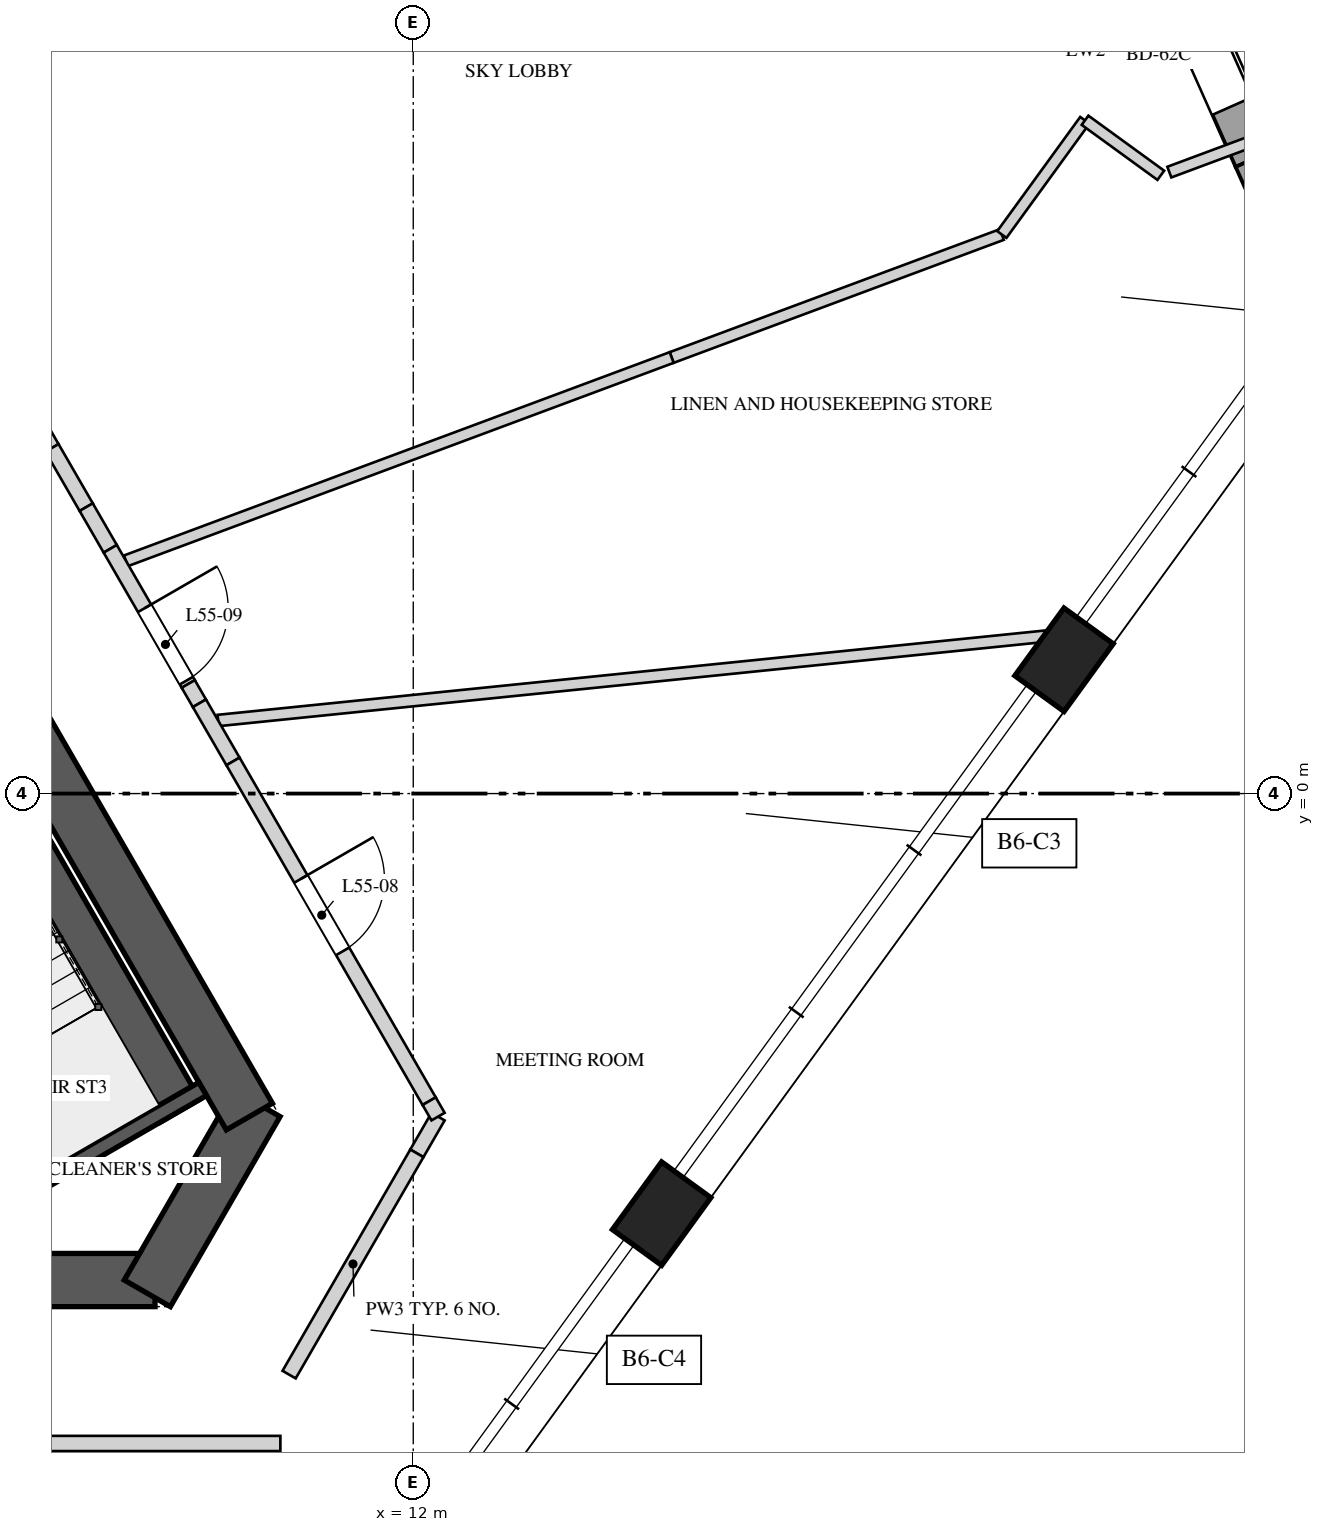
"""IFC4 building model, lengths in metres.
Left out: names, types, materials, properties, quantities, classifications, styles, units other than length and angle.
Written with IfcOpenShell. Run it as: python <this file> out.ifc"""

import sys

from ifc_helpers import new_model, si_unit, direction, frame, frame_2d, origin, origin_2d, place, context, subcontext, project, spatial, polyline, rectangle, outline, extrude, element, fill, save


model = new_model("IFC4")
c1 = context("Model", 3, precision=1e-05, world=origin(), true_north=direction((0.0, 1.0)))
c2 = subcontext(c1, "Body", "Model", "MODEL_VIEW")
j1 = project(units=[si_unit("LENGTHUNIT", "METRE"), si_unit("PLANEANGLEUNIT", "RADIAN")], contexts=[c1])
p1 = place(None, origin())
s1 = spatial("IfcSite", under=j1, at=p1, CompositionType="ELEMENT")
p2 = place(p1, origin())
s2 = spatial("IfcBuilding", under=s1, at=p2, CompositionType="ELEMENT")
p3 = place(p2, frame((0.0, 0.0, 237.2)))
s3 = spatial("IfcBuildingStorey", under=s2, at=p3, CompositionType="ELEMENT", Elevation=237.2)
p4 = place(p3, frame((-8.603, -6.4, 0.0), z_axis=(0.0, 0.0, 1.0), x_axis=(1.0, 0.0, 0.0)))
e1 = element("IfcWall", 1, at=p4, inside=s3, PredefinedType="SHEAR", context=c2, shape_type="SweptSolid", body=[
    extrude(rectangle(XDim=17.205, YDim=0.7, at=frame_2d((8.603, 0.0))), origin(), (0.0, 0.0, 1.0), 4.0),
])
p5 = place(p4, frame((6.808, 0.0, 0.0)))
e2 = element("IfcOpeningElement", 2, at=p5, cuts=e1, PredefinedType="OPENING", context=c2, shape_type="SweptSolid", body=[
    extrude(rectangle(XDim=1.0, YDim=2.4, at=frame_2d((0.5, 1.2))), frame((0.0, 0.36, 0.0), z_axis=(0.0, -1.0, 0.0), x_axis=(1.0, 0.0, 0.0)), (0.0, 0.0, 1.0), 0.72),
])
p6 = place(p4, frame((14.922, 0.0, 0.0)))
e3 = element("IfcOpeningElement", 3, at=p6, cuts=e1, PredefinedType="OPENING", context=c2, shape_type="SweptSolid", body=[
    extrude(rectangle(XDim=0.8, YDim=2.1, at=frame_2d((0.4, 1.05))), frame((0.0, 0.36, 0.0), z_axis=(0.0, -1.0, 0.0), x_axis=(1.0, 0.0, 0.0)), (0.0, 0.0, 1.0), 0.72),
])
p7 = place(p3, frame((8.501, -6.575, 0.0), z_axis=(0.0, 0.0, 1.0), x_axis=(0.499995765644, 0.866027848477, 0.0)))
e4 = element("IfcWall", 4, at=p7, inside=s3, PredefinedType="SHEAR", context=c2, shape_type="SweptSolid", body=[
    extrude(rectangle(XDim=2.887, YDim=0.7, at=frame_2d((1.443, 0.0))), origin(), (0.0, 0.0, 1.0), 4.0),
])
p8 = place(p3, frame((9.844, -4.25, 0.0), z_axis=(0.0, 0.0, 1.0), x_axis=(-0.500003331888, 0.866023480109, 0.0)))
e5 = element("IfcWall", 5, at=p8, inside=s3, PredefinedType="SHEAR", context=c2, shape_type="SweptSolid", body=[
    extrude(rectangle(XDim=17.205, YDim=0.7, at=frame_2d((8.603, 0.0))), origin(), (0.0, 0.0, 1.0), 4.0),
])
p9 = place(p8, frame((6.877, 0.0, 0.0)))
e6 = element("IfcOpeningElement", 6, at=p9, cuts=e5, PredefinedType="OPENING", context=c2, shape_type="SweptSolid", body=[
    extrude(rectangle(XDim=1.0, YDim=2.4, at=frame_2d((0.5, 1.2))), frame((0.0, 0.36, 0.0), z_axis=(0.0, -1.0, 0.0), x_axis=(1.0, 0.0, 0.0)), (0.0, 0.0, 1.0), 0.72),
])
for number, where, z_axis, x_axis in (
    (7, (15.268, -5.526, -0.35), (0.0, 0.0, 1.0), (0.588, 0.809, 0.0)),
    (8, (20.562, 1.76, -0.35), (0.0, 0.0, 1.0), (0.588, 0.809, 0.0)),
):
    element("IfcColumn", number, at=place(p3, frame(where, z_axis=z_axis, x_axis=x_axis)), inside=s3, PredefinedType="COLUMN", context=c2, shape_type="SweptSolid", body=[
        extrude(rectangle(XDim=1.1, YDim=0.8, at=origin_2d()), origin(), (0.0, 0.0, 1.0), 4.35),
    ])
p10 = place(p3, frame((21.807, 11.625, 0.0), z_axis=(0.0, 0.0, 1.0), x_axis=(0.406727323635, -0.913549606868, 0.0)))
e9 = element("IfcWall", 9, at=p10, inside=s3, PredefinedType="SOLIDWALL", context=c2, shape_type="SweptSolid", body=[
    extrude(rectangle(XDim=3.5, YDim=0.9, at=frame_2d((1.75, 0.0))), origin(), (0.0, 0.0, 1.0), 3.3),
])
p11 = place(p10, frame((0.75, 0.0, 0.0)))
e10 = element("IfcOpeningElement", 10, at=p11, cuts=e9, PredefinedType="OPENING", context=c2, shape_type="SweptSolid", body=[
    extrude(rectangle(XDim=2.0, YDim=2.4, at=frame_2d((1.0, 1.2))), frame((0.0, 0.46, 0.0), z_axis=(0.0, -1.0, 0.0), x_axis=(1.0, 0.0, 0.0)), (0.0, 0.0, 1.0), 0.92),
])
p12 = place(p3, frame((24.719, 8.844, 0.0), z_axis=(0.0, 0.0, 1.0), x_axis=(-0.913562124494, -0.406699206651, 0.0)))
e11 = element("IfcWall", 11, at=p12, inside=s3, PredefinedType="SOLIDWALL", context=c2, shape_type="SweptSolid", body=[
    extrude(rectangle(XDim=1.979, YDim=0.45, at=frame_2d((0.99, 0.0))), origin(), (0.0, 0.0, 1.0), 2.55),
])
p13 = place(p3, frame((8.933, -4.172, 0.0), z_axis=(0.0, 0.0, 1.0), x_axis=(-0.500026960575, 0.86600983753, 0.0)))
e12 = element("IfcWall", 12, at=p13, inside=s3, PredefinedType="SOLIDWALL", context=c2, shape_type="SweptSolid", body=[
    extrude(rectangle(XDim=6.2, YDim=0.6, at=frame_2d((3.1, 0.0))), origin(), (0.0, 0.0, 1.0), 3.65),
])
p14 = place(p3, frame((6.501, -5.461, 0.0), z_axis=(0.0, 0.0, 1.0), x_axis=(0.866035871367, 0.499981869177, 0.0)))
e13 = element("IfcWall", 13, at=p14, inside=s3, PredefinedType="SOLIDWALL", context=c2, shape_type="SweptSolid", body=[
    extrude(rectangle(XDim=3.15, YDim=0.2, at=frame_2d((1.575, 0.0))), origin(), (0.0, 0.0, 1.0), 3.65),
])
p15 = place(p3, frame((9.433, 0.961, 0.0), z_axis=(0.0, 0.0, 1.0), x_axis=(0.994848032618, 0.101377472819, 0.0)))
e14 = element("IfcWall", 14, at=p15, inside=s3, PredefinedType="PARTITIONING", context=c2, shape_type="SweptSolid", body=[
    extrude(rectangle(XDim=11.222, YDim=0.15, at=frame_2d((5.611, 0.0))), origin(), (0.0, 0.0, 1.0), 2.75),
])
p16 = place(p3, frame((19.743, 7.355, 0.0), z_axis=(0.0, 0.0, 1.0), x_axis=(-0.937095289684, -0.349073657058, 0.0)))
e15 = element("IfcWall", 15, at=p16, inside=s3, PredefinedType="PARTITIONING", context=c2, shape_type="SweptSolid", body=[
    extrude(rectangle(XDim=4.635, YDim=0.15, at=frame_2d((2.318, 0.0))), origin(), (0.0, 0.0, 1.0), 3.65),
])
p17 = place(p3, frame((15.399, 5.737, 0.0), z_axis=(0.0, 0.0, 1.0), x_axis=(-0.937094379244, -0.349076101144, 0.0)))
e16 = element("IfcWall", 16, at=p17, inside=s3, PredefinedType="PARTITIONING", context=c2, shape_type="SweptSolid", body=[
    extrude(rectangle(XDim=7.661, YDim=0.15, at=frame_2d((3.831, 0.0))), origin(), (0.0, 0.0, 1.0), 2.55),
])
p18 = place(p3, frame((20.835, 8.858, 0.0), z_axis=(0.0, 0.0, 1.0), x_axis=(-0.587796499564, -0.809008822634, 0.0)))
e17 = element("IfcWall", 17, at=p18, inside=s3, PredefinedType="PARTITIONING", context=c2, shape_type="SweptSolid", body=[
    extrude(rectangle(XDim=1.857, YDim=0.15, at=frame_2d((0.929, 0.0))), origin(), (0.0, 0.0, 1.0), 3.65),
])
p19 = place(p3, frame((21.835, 8.134, 0.0), z_axis=(0.0, 0.0, 1.0), x_axis=(-0.808993112519, 0.587818121443, 0.0)))
e18 = element("IfcWall", 18, at=p19, inside=s3, PredefinedType="PARTITIONING", context=c2, shape_type="SweptSolid", body=[
    extrude(rectangle(XDim=1.232, YDim=0.15, at=frame_2d((0.616, 0.0))), origin(), (0.0, 0.0, 1.0), 3.65),
])
p20 = place(p3, frame((23.031, 8.58, 0.0), z_axis=(0.0, 0.0, 1.0), x_axis=(-0.937141646559, -0.348949185819, 0.0)))
e19 = element("IfcWall", 19, at=p20, inside=s3, PredefinedType="PARTITIONING", context=c2, shape_type="SweptSolid", body=[
    extrude(rectangle(XDim=1.157, YDim=0.15, at=frame_2d((0.579, 0.0))), origin(), (0.0, 0.0, 1.0), 3.65),
])
p21 = place(p3, frame((12.326, -4.25, 0.0), z_axis=(0.0, 0.0, 1.0), x_axis=(-0.500000383388, -0.866025182435, 0.0)))
e20 = element("IfcWall", 20, at=p21, inside=s3, PredefinedType="SOLIDWALL", context=c2, shape_type="SweptSolid", body=[
    extrude(rectangle(XDim=0.558, YDim=0.2, at=frame_2d((0.279, 0.0))), origin(), (0.0, 0.0, 1.0), 2.95),
])
p22 = place(p3, frame((12.048, -4.733, 0.0), z_axis=(0.0, 0.0, 1.0), x_axis=(-0.500005339912, -0.866022320763, 0.0)))
e21 = element("IfcWall", 21, at=p22, inside=s3, PredefinedType="SOLIDWALL", context=c2, shape_type="SweptSolid", body=[
    extrude(rectangle(XDim=3.362, YDim=0.2, at=frame_2d((1.681, 0.0))), origin(), (0.0, 0.0, 1.0), 3.65),
])
p23 = place(p3, frame((10.252, -8.55, 0.0), z_axis=(0.0, 0.0, 1.0), x_axis=(-1.0, 0.0, 0.0)))
e22 = element("IfcWall", 22, at=p23, inside=s3, PredefinedType="SOLIDWALL", context=c2, shape_type="SweptSolid", body=[
    extrude(rectangle(XDim=3.153, YDim=0.2, at=frame_2d((1.576, 0.0))), origin(), (0.0, 0.0, 1.0), 3.65),
])
p24 = place(p3, frame((6.615, 5.643, 0.0), z_axis=(0.0, 0.0, 1.0), x_axis=(0.499978579288, -0.866037770685, 0.0)))
e23 = element("IfcWall", 23, at=p24, inside=s3, PredefinedType="SOLIDWALL", context=c2, shape_type="SweptSolid", body=[
    extrude(rectangle(XDim=1.265, YDim=0.2, at=frame_2d((0.633, 0.0))), origin(), (0.0, 0.0, 1.0), 3.65),
])
p25 = place(p3, frame((7.247, 4.548, 0.0), z_axis=(0.0, 0.0, 1.0), x_axis=(0.499902469156, -0.866081705922, 0.0)))
e24 = element("IfcWall", 24, at=p25, inside=s3, PredefinedType="SOLIDWALL", context=c2, shape_type="SweptSolid", body=[
    extrude(rectangle(XDim=0.9, YDim=0.2, at=frame_2d((0.45, 0.0))), origin(), (0.0, 0.0, 1.0), 2.55),
])
p26 = place(p3, frame((7.697, 3.768, 0.0), z_axis=(0.0, 0.0, 1.0), x_axis=(0.50012328804, -0.865954211699, 0.0)))
e25 = element("IfcWall", 25, at=p26, inside=s3, PredefinedType="SOLIDWALL", context=c2, shape_type="SweptSolid", body=[
    extrude(rectangle(XDim=0.633, YDim=0.2, at=frame_2d((0.316, 0.0))), origin(), (0.0, 0.0, 1.0), 3.65),
])
p27 = place(p3, frame((8.013, 3.22, 0.0), z_axis=(0.0, 0.0, 1.0), x_axis=(0.500014089762, -0.866017268904, 0.0)))
e26 = element("IfcWall", 26, at=p27, inside=s3, PredefinedType="SOLIDWALL", context=c2, shape_type="SweptSolid", body=[
    extrude(outline(polyline([(0.0, 0.0), (2.053, 0.0), (2.053, 3.65), (0.917, 3.65), (0.917, 2.55), (0.0, 2.55), (0.0, 0.0)])), frame((0.0, 0.1, 0.0), z_axis=(0.0, -1.0, 0.0), x_axis=(1.0, 0.0, 0.0)), (0.0, 0.0, 1.0), 0.2),
])
p28 = place(p27, frame((0.903, 0.0, 0.0)))
e27 = element("IfcOpeningElement", 27, at=p28, cuts=e26, PredefinedType="OPENING", context=c2, shape_type="SweptSolid", body=[
    extrude(rectangle(XDim=1.1, YDim=2.4, at=frame_2d((0.55, 1.2))), frame((0.0, 0.11, 0.0), z_axis=(0.0, -1.0, 0.0), x_axis=(1.0, 0.0, 0.0)), (0.0, 0.0, 1.0), 0.22),
])
p29 = place(p3, frame((9.04, 1.442, 0.0), z_axis=(0.0, 0.0, 1.0), x_axis=(0.499986503906, -0.866033195618, 0.0)))
e28 = element("IfcWall", 28, at=p29, inside=s3, PredefinedType="SOLIDWALL", context=c2, shape_type="SweptSolid", body=[
    extrude(rectangle(XDim=0.293, YDim=0.2, at=frame_2d((0.147, 0.0))), origin(), (0.0, 0.0, 1.0), 3.65),
])
p30 = place(p3, frame((9.187, 1.188, 0.0), z_axis=(0.0, 0.0, 1.0), x_axis=(0.500121072013, -0.86595549154, 0.0)))
e29 = element("IfcWall", 29, at=p30, inside=s3, PredefinedType="SOLIDWALL", context=c2, shape_type="SweptSolid", body=[
    extrude(rectangle(XDim=0.884, YDim=0.2, at=frame_2d((0.442, 0.0))), origin(), (0.0, 0.0, 1.0), 2.75),
])
p31 = place(p3, frame((9.629, 0.423, 0.0), z_axis=(0.0, 0.0, 1.0), x_axis=(0.499995433041, -0.866028040503, 0.0)))
e30 = element("IfcWall", 30, at=p31, inside=s3, PredefinedType="SOLIDWALL", context=c2, shape_type="SweptSolid", body=[
    extrude(rectangle(XDim=5.161, YDim=0.2, at=frame_2d((2.581, 0.0))), origin(), (0.0, 0.0, 1.0), 3.65),
])
p32 = place(p31, frame((1.785, 0.0, 0.0)))
e31 = element("IfcOpeningElement", 31, at=p32, cuts=e30, PredefinedType="OPENING", context=c2, shape_type="SweptSolid", body=[
    extrude(rectangle(XDim=1.1, YDim=2.4, at=frame_2d((0.55, 1.2))), frame((0.0, 0.11, 0.0), z_axis=(0.0, -1.0, 0.0), x_axis=(1.0, 0.0, 0.0)), (0.0, 0.0, 1.0), 0.22),
])
p33 = place(p3, frame((12.209, -4.047, 0.0), z_axis=(0.0, 0.0, 1.0), x_axis=(0.49972245349, -0.866185586049, 0.0)))
e32 = element("IfcWall", 32, at=p33, inside=s3, PredefinedType="SOLIDWALL", context=c2, shape_type="SweptSolid", body=[
    extrude(rectangle(XDim=0.235, YDim=0.2, at=frame_2d((0.117, 0.0))), origin(), (0.0, 0.0, 1.0), 2.95),
])
p34 = place(p11, origin())
e33 = element("IfcDoor", 33, at=p34, inside=s3, OperationType="SLIDING_TO_LEFT", PredefinedType="DOOR", context=c2, shape_type="SweptSolid", body=[
    extrude(rectangle(XDim=2.0, YDim=2.4, at=frame_2d((1.0, 1.2))), frame((0.0, 0.025, 0.0), z_axis=(0.0, -1.0, 0.0), x_axis=(1.0, 0.0, 0.0)), (0.0, 0.0, 1.0), 0.05),
])
fill(e10, e33)
p35 = place(p32, origin())
e34 = element("IfcDoor", 34, at=p35, inside=s3, OperationType="SINGLE_SWING_RIGHT", PredefinedType="DOOR", context=c2, shape_type="SweptSolid", body=[
    extrude(rectangle(XDim=1.1, YDim=2.4, at=frame_2d((0.55, 1.2))), frame((0.0, 0.025, 0.0), z_axis=(0.0, -1.0, 0.0), x_axis=(1.0, 0.0, 0.0)), (0.0, 0.0, 1.0), 0.05),
])
fill(e31, e34)
p36 = place(p28, origin())
e35 = element("IfcDoor", 35, at=p36, inside=s3, OperationType="SINGLE_SWING_LEFT", PredefinedType="DOOR", context=c2, shape_type="SweptSolid", body=[
    extrude(rectangle(XDim=1.1, YDim=2.4, at=frame_2d((0.55, 1.2))), frame((0.0, 0.025, 0.0), z_axis=(0.0, -1.0, 0.0), x_axis=(1.0, 0.0, 0.0)), (0.0, 0.0, 1.0), 0.05),
])
fill(e27, e35)
save(model, sys.argv[1])
